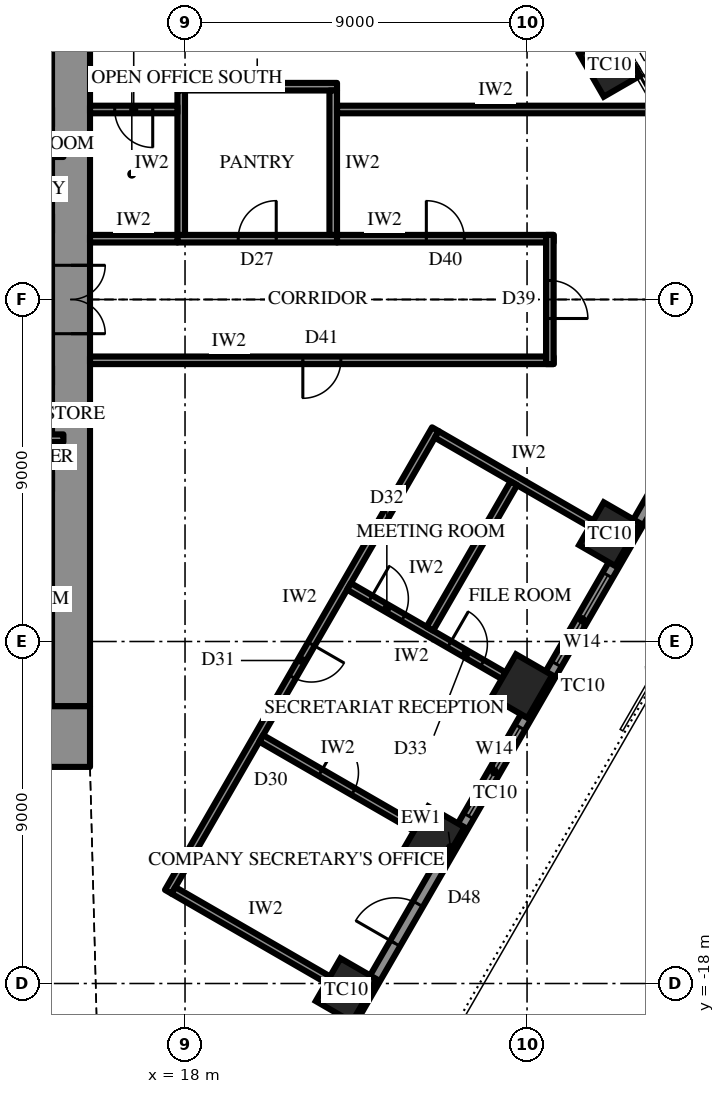
"""IFC4 building model, lengths in metres.
Left out: names, types, materials, properties, quantities, classifications, styles, units other than length and angle.
Written with IfcOpenShell. Run it as: python <this file> out.ifc"""

import sys

from ifc_helpers import new_model, si_unit, direction, frame, frame_2d, origin, origin_2d, place, context, subcontext, project, spatial, rectangle, extrude, element, fill, save


model = new_model("IFC4")
c1 = context("Model", 3, precision=1e-05, world=origin(), true_north=direction((0.0, 1.0)))
c2 = subcontext(c1, "Body", "Model", "MODEL_VIEW")
j1 = project(units=[si_unit("LENGTHUNIT", "METRE"), si_unit("PLANEANGLEUNIT", "RADIAN")], contexts=[c1])
p1 = place(None, origin())
s1 = spatial("IfcSite", under=j1, at=p1, CompositionType="ELEMENT")
p2 = place(p1, origin())
s2 = spatial("IfcBuilding", under=s1, at=p2, CompositionType="ELEMENT")
p3 = place(p2, frame((0.0, 0.0, 253.3)))
s3 = spatial("IfcBuildingStorey", under=s2, at=p3, CompositionType="ELEMENT", Elevation=253.3)
for number, where, z_axis, x_axis in (
    (1, (29.171, 6.175, 0.0), (0.0, 0.0, 1.0), (-0.5, 0.866, 0.0)),
    (2, (22.242, -18.175, 0.0), (0.0, 0.0, 1.0), (0.5, 0.866, 0.0)),
    (3, (24.552, -14.175, 0.0), (0.0, 0.0, 1.0), (0.5, 0.866, 0.0)),
    (4, (26.861, -10.175, 0.0), (0.0, 0.0, 1.0), (0.5, 0.866, 0.0)),
    (5, (29.171, -6.175, 0.0), (0.0, 0.0, 1.0), (0.5, 0.866, 0.0)),
):
    element("IfcColumn", number, at=place(p3, frame(where, z_axis=z_axis, x_axis=x_axis)), inside=s3, PredefinedType="COLUMN", context=c2, shape_type="SweptSolid", body=[
        extrude(rectangle(XDim=1.3, YDim=1.1, at=origin_2d()), origin(), (0.0, 0.0, 1.0), 4.2),
    ])
p4 = place(p3, frame((15.5, -11.5, 0.0), z_axis=(0.0, 0.0, 1.0), x_axis=(-1.0, 0.0, 0.0)))
e6 = element("IfcWall", 6, at=p4, inside=s3, PredefinedType="SHEAR", context=c2, shape_type="SweptSolid", body=[
    extrude(rectangle(XDim=31.0, YDim=1.6, at=frame_2d((15.5, 0.0))), origin(), (0.0, 0.0, 1.0), 4.2),
])
p5 = place(p4, frame((16.35, 0.0, 0.0)))
e7 = element("IfcOpeningElement", 7, at=p5, cuts=e6, PredefinedType="OPENING", context=c2, shape_type="SweptSolid", body=[
    extrude(rectangle(XDim=0.9, YDim=2.2, at=frame_2d((0.45, 1.1))), frame((0.0, 0.81, 0.0), z_axis=(0.0, -1.0, 0.0), x_axis=(1.0, 0.0, 0.0)), (0.0, 0.0, 1.0), 1.62),
])
p6 = place(p4, frame((19.35, 0.0, 0.0)))
e8 = element("IfcOpeningElement", 8, at=p6, cuts=e6, PredefinedType="OPENING", context=c2, shape_type="SweptSolid", body=[
    extrude(rectangle(XDim=0.9, YDim=2.2, at=frame_2d((0.45, 1.1))), frame((0.0, 0.81, 0.0), z_axis=(0.0, -1.0, 0.0), x_axis=(1.0, 0.0, 0.0)), (0.0, 0.0, 1.0), 1.62),
])
p7 = place(p4, frame((22.4, 0.0, 0.0)))
e9 = element("IfcOpeningElement", 9, at=p7, cuts=e6, PredefinedType="OPENING", context=c2, shape_type="SweptSolid", body=[
    extrude(rectangle(XDim=1.0, YDim=2.2, at=frame_2d((0.5, 1.1))), frame((0.0, 0.81, 0.0), z_axis=(0.0, -1.0, 0.0), x_axis=(1.0, 0.0, 0.0)), (0.0, 0.0, 1.0), 1.62),
])
p8 = place(p4, frame((1.65, 0.0, 0.0)))
e10 = element("IfcOpeningElement", 10, at=p8, cuts=e6, PredefinedType="OPENING", context=c2, shape_type="SweptSolid", body=[
    extrude(rectangle(XDim=0.9, YDim=2.2, at=frame_2d((0.45, 1.1))), frame((0.0, 0.81, 0.0), z_axis=(0.0, -1.0, 0.0), x_axis=(1.0, 0.0, 0.0)), (0.0, 0.0, 1.0), 1.62),
])
p9 = place(p4, frame((4.65, 0.0, 0.0)))
e11 = element("IfcOpeningElement", 11, at=p9, cuts=e6, PredefinedType="OPENING", context=c2, shape_type="SweptSolid", body=[
    extrude(rectangle(XDim=0.9, YDim=2.2, at=frame_2d((0.45, 1.1))), frame((0.0, 0.81, 0.0), z_axis=(0.0, -1.0, 0.0), x_axis=(1.0, 0.0, 0.0)), (0.0, 0.0, 1.0), 1.62),
])
p10 = place(p4, frame((25.45, 0.0, 0.0)))
e12 = element("IfcOpeningElement", 12, at=p10, cuts=e6, PredefinedType="OPENING", context=c2, shape_type="SweptSolid", body=[
    extrude(rectangle(XDim=0.9, YDim=2.2, at=frame_2d((0.45, 1.1))), frame((0.0, 0.81, 0.0), z_axis=(0.0, -1.0, 0.0), x_axis=(1.0, 0.0, 0.0)), (0.0, 0.0, 1.0), 1.62),
])
p11 = place(p4, frame((28.45, 0.0, 0.0)))
e13 = element("IfcOpeningElement", 13, at=p11, cuts=e6, PredefinedType="OPENING", context=c2, shape_type="SweptSolid", body=[
    extrude(rectangle(XDim=0.9, YDim=2.2, at=frame_2d((0.45, 1.1))), frame((0.0, 0.81, 0.0), z_axis=(0.0, -1.0, 0.0), x_axis=(1.0, 0.0, 0.0)), (0.0, 0.0, 1.0), 1.62),
])
p12 = place(p3, frame((15.0, -10.7, 0.0), z_axis=(0.0, 0.0, 1.0), x_axis=(0.0, 1.0, 0.0)))
e14 = element("IfcWall", 14, at=p12, inside=s3, PredefinedType="SHEAR", context=c2, shape_type="SweptSolid", body=[
    extrude(rectangle(XDim=21.4, YDim=1.0, at=frame_2d((10.7, 0.0))), origin(), (0.0, 0.0, 1.0), 4.2),
])
p13 = place(p12, frame((9.8, 0.0, 0.0)))
e15 = element("IfcOpeningElement", 15, at=p13, cuts=e14, PredefinedType="OPENING", context=c2, shape_type="SweptSolid", body=[
    extrude(rectangle(XDim=1.8, YDim=2.4, at=frame_2d((0.9, 1.2))), frame((0.0, 0.51, 0.0), z_axis=(0.0, -1.0, 0.0), x_axis=(1.0, 0.0, 0.0)), (0.0, 0.0, 1.0), 1.02),
])
p14 = place(p3, frame((12.3, 2.0, 0.0), z_axis=(0.0, 0.0, 1.0), x_axis=(1.0, 0.0, 0.0)))
e16 = element("IfcWall", 16, at=p14, inside=s3, PredefinedType="SHEAR", context=c2, shape_type="SweptSolid", body=[
    extrude(rectangle(XDim=2.2, YDim=0.5, at=frame_2d((1.1, 0.0))), origin(), (0.0, 0.0, 1.0), 4.2),
])
p15 = place(p14, frame((0.8, 0.0, 0.0)))
e17 = element("IfcOpeningElement", 17, at=p15, cuts=e16, PredefinedType="OPENING", context=c2, shape_type="SweptSolid", body=[
    extrude(rectangle(XDim=0.9, YDim=2.2, at=frame_2d((0.45, 1.1))), frame((0.0, 0.26, 0.0), z_axis=(0.0, -1.0, 0.0), x_axis=(1.0, 0.0, 0.0)), (0.0, 0.0, 1.0), 0.52),
])
p16 = place(p3, frame((12.3, 4.8, 0.0), z_axis=(0.0, 0.0, 1.0), x_axis=(1.0, 0.0, 0.0)))
e18 = element("IfcWall", 18, at=p16, inside=s3, PredefinedType="SHEAR", context=c2, shape_type="SweptSolid", body=[
    extrude(rectangle(XDim=2.2, YDim=0.5, at=frame_2d((1.1, 0.0))), origin(), (0.0, 0.0, 1.0), 4.2),
])
p17 = place(p3, frame((18.707, -25.299, 0.0), z_axis=(0.0, 0.0, 1.0), x_axis=(0.500000442367, 0.866025148383, 0.0)))
e19 = element("IfcWall", 19, at=p17, inside=s3, PredefinedType="SOLIDWALL", context=c2, shape_type="SweptSolid", body=[
    extrude(rectangle(XDim=25.113, YDim=0.3, at=frame_2d((12.556, 0.0))), origin(), (0.0, 0.0, 1.0), 2.8),
])
p18 = place(p17, frame((4.278, 0.0, 0.6)))
e20 = element("IfcOpeningElement", 20, at=p18, cuts=e19, PredefinedType="OPENING", context=c2, shape_type="SweptSolid", body=[
    extrude(rectangle(XDim=2.7, YDim=1.95, at=frame_2d((1.35, 0.975))), frame((0.0, 0.16, 0.0), z_axis=(0.0, -1.0, 0.0), x_axis=(1.0, 0.0, 0.0)), (0.0, 0.0, 1.0), 0.32),
])
p19 = place(p17, frame((9.647, 0.0, 0.0)))
e21 = element("IfcOpeningElement", 21, at=p19, cuts=e19, PredefinedType="OPENING", context=c2, shape_type="SweptSolid", body=[
    extrude(rectangle(XDim=1.2, YDim=2.4, at=frame_2d((0.6, 1.2))), frame((0.0, 0.16, 0.0), z_axis=(0.0, -1.0, 0.0), x_axis=(1.0, 0.0, 0.0)), (0.0, 0.0, 1.0), 0.32),
])
p20 = place(p17, frame((13.516, 0.0, 0.6)))
e22 = element("IfcOpeningElement", 22, at=p20, cuts=e19, PredefinedType="OPENING", context=c2, shape_type="SweptSolid", body=[
    extrude(rectangle(XDim=2.7, YDim=1.95, at=frame_2d((1.35, 0.975))), frame((0.0, 0.16, 0.0), z_axis=(0.0, -1.0, 0.0), x_axis=(1.0, 0.0, 0.0)), (0.0, 0.0, 1.0), 0.32),
])
p21 = place(p17, frame((18.135, 0.0, 0.6)))
e23 = element("IfcOpeningElement", 23, at=p21, cuts=e19, PredefinedType="OPENING", context=c2, shape_type="SweptSolid", body=[
    extrude(rectangle(XDim=2.7, YDim=1.95, at=frame_2d((1.35, 0.975))), frame((0.0, 0.16, 0.0), z_axis=(0.0, -1.0, 0.0), x_axis=(1.0, 0.0, 0.0)), (0.0, 0.0, 1.0), 0.32),
])
p22 = place(p3, frame((12.3, 3.85, 0.0), z_axis=(0.0, 0.0, 1.0), x_axis=(1.0, 0.0, 0.0)))
e24 = element("IfcWall", 24, at=p22, inside=s3, PredefinedType="PARTITIONING", context=c2, shape_type="SweptSolid", body=[
    extrude(rectangle(XDim=2.5, YDim=0.2, at=frame_2d((1.25, 0.0))), origin(), (0.0, 0.0, 1.0), 4.0),
])
p23 = place(p3, frame((14.8, -3.65, 0.0), z_axis=(0.0, 0.0, 1.0), x_axis=(-1.0, 0.0, 0.0)))
e25 = element("IfcWall", 25, at=p23, inside=s3, PredefinedType="PARTITIONING", context=c2, shape_type="SweptSolid", body=[
    extrude(rectangle(XDim=1.0, YDim=0.2, at=frame_2d((0.5, 0.0))), origin(), (0.0, 0.0, 1.0), 4.0),
])
p24 = place(p3, frame((17.559, -15.587, 0.0), z_axis=(0.0, 0.0, 1.0), x_axis=(0.500002095642, 0.866024193862, 0.0)))
e26 = element("IfcWall", 26, at=p24, inside=s3, PredefinedType="PARTITIONING", context=c2, shape_type="SweptSolid", body=[
    extrude(rectangle(XDim=14.057, YDim=0.2, at=frame_2d((7.028, 0.0))), origin(), (0.0, 0.0, 1.0), 4.0),
])
p25 = place(p24, frame((6.528, 0.0, 0.0)))
e27 = element("IfcOpeningElement", 27, at=p25, cuts=e26, PredefinedType="OPENING", context=c2, shape_type="SweptSolid", body=[
    extrude(rectangle(XDim=1.0, YDim=2.2, at=frame_2d((0.5, 1.1))), frame((0.0, 0.11, 0.0), z_axis=(0.0, -1.0, 0.0), x_axis=(1.0, 0.0, 0.0)), (0.0, 0.0, 1.0), 0.22),
])
p26 = place(p3, frame((17.696, -15.55, 0.0), z_axis=(0.0, 0.0, 1.0), x_axis=(0.866038532462, -0.499977259774, 0.0)))
e28 = element("IfcWall", 28, at=p26, inside=s3, PredefinedType="PARTITIONING", context=c2, shape_type="SweptSolid", body=[
    extrude(rectangle(XDim=4.7, YDim=0.2, at=frame_2d((2.35, 0.0))), origin(), (0.0, 0.0, 1.0), 3.082),
])
p27 = place(p3, frame((20.005, -11.55, 0.0), z_axis=(0.0, 0.0, 1.0), x_axis=(0.866038532462, -0.499977259774, 0.0)))
e29 = element("IfcWall", 29, at=p27, inside=s3, PredefinedType="PARTITIONING", context=c2, shape_type="SweptSolid", body=[
    extrude(rectangle(XDim=4.7, YDim=0.2, at=frame_2d((2.35, 0.0))), origin(), (0.0, 0.0, 1.0), 3.082),
])
p28 = place(p27, frame((1.8, 0.0, 0.0)))
e30 = element("IfcOpeningElement", 30, at=p28, cuts=e29, PredefinedType="OPENING", context=c2, shape_type="SweptSolid", body=[
    extrude(rectangle(XDim=1.0, YDim=2.2, at=frame_2d((0.5, 1.1))), frame((0.0, 0.11, 0.0), z_axis=(0.0, -1.0, 0.0), x_axis=(1.0, 0.0, 0.0)), (0.0, 0.0, 1.0), 0.22),
])
p29 = place(p3, frame((22.315, -7.55, 0.0), z_axis=(0.0, 0.0, 1.0), x_axis=(0.866038532462, -0.499977259774, 0.0)))
e31 = element("IfcWall", 31, at=p29, inside=s3, PredefinedType="PARTITIONING", context=c2, shape_type="SweptSolid", body=[
    extrude(rectangle(XDim=4.7, YDim=0.2, at=frame_2d((2.35, 0.0))), origin(), (0.0, 0.0, 1.0), 3.082),
])
p30 = place(p29, frame((0.65, 0.0, 0.0)))
e32 = element("IfcOpeningElement", 32, at=p30, cuts=e31, PredefinedType="OPENING", context=c2, shape_type="SweptSolid", body=[
    extrude(rectangle(XDim=1.0, YDim=2.2, at=frame_2d((0.5, 1.1))), frame((0.0, 0.11, 0.0), z_axis=(0.0, -1.0, 0.0), x_axis=(1.0, 0.0, 0.0)), (0.0, 0.0, 1.0), 0.22),
])
p31 = place(p29, frame((3.05, 0.0, 0.0)))
e33 = element("IfcOpeningElement", 33, at=p31, cuts=e31, PredefinedType="OPENING", context=c2, shape_type="SweptSolid", body=[
    extrude(rectangle(XDim=1.0, YDim=2.2, at=frame_2d((0.5, 1.1))), frame((0.0, 0.11, 0.0), z_axis=(0.0, -1.0, 0.0), x_axis=(1.0, 0.0, 0.0)), (0.0, 0.0, 1.0), 0.22),
])
p32 = place(p3, frame((24.624, -3.55, 0.0), z_axis=(0.0, 0.0, 1.0), x_axis=(0.866038532462, -0.499977259774, 0.0)))
e34 = element("IfcWall", 34, at=p32, inside=s3, PredefinedType="PARTITIONING", context=c2, shape_type="SweptSolid", body=[
    extrude(rectangle(XDim=4.7, YDim=0.2, at=frame_2d((2.35, 0.0))), origin(), (0.0, 0.0, 1.0), 3.082),
])
p33 = place(p3, frame((24.443, -8.663, 0.0), z_axis=(0.0, 0.0, 1.0), x_axis=(0.499983916363, 0.866034689477, 0.0)))
e35 = element("IfcWall", 35, at=p33, inside=s3, PredefinedType="PARTITIONING", context=c2, shape_type="SweptSolid", body=[
    extrude(rectangle(XDim=4.419, YDim=0.2, at=frame_2d((2.209, 0.0))), origin(), (0.0, 0.0, 1.0), 4.0),
])
p34 = place(p3, frame((17.8, 1.6, 0.0), z_axis=(0.0, 0.0, 1.0), x_axis=(1.0, 0.0, 0.0)))
e36 = element("IfcWall", 36, at=p34, inside=s3, PredefinedType="PARTITIONING", context=c2, shape_type="SweptSolid", body=[
    extrude(rectangle(XDim=4.2, YDim=0.2, at=frame_2d((2.1, 0.0))), origin(), (0.0, 0.0, 1.0), 4.0),
])
p35 = place(p34, frame((1.6, 0.0, 0.0)))
e37 = element("IfcOpeningElement", 37, at=p35, cuts=e36, PredefinedType="OPENING", context=c2, shape_type="SweptSolid", body=[
    extrude(rectangle(XDim=1.0, YDim=2.2, at=frame_2d((0.5, 1.1))), frame((0.0, 0.11, 0.0), z_axis=(0.0, -1.0, 0.0), x_axis=(1.0, 0.0, 0.0)), (0.0, 0.0, 1.0), 0.22),
])
p36 = place(p3, frame((17.8, 5.6, 0.0), z_axis=(0.0, 0.0, 1.0), x_axis=(1.0, 0.0, 0.0)))
e38 = element("IfcWall", 38, at=p36, inside=s3, PredefinedType="PARTITIONING", context=c2, shape_type="SweptSolid", body=[
    extrude(rectangle(XDim=4.2, YDim=0.2, at=frame_2d((2.1, 0.0))), origin(), (0.0, 0.0, 1.0), 4.0),
])
for number, where, z_axis, x_axis in (
    (39, (17.9, 1.7, 0.0), (0.0, 0.0, 1.0), (0.0, 1.0, 0.0)),
    (40, (21.9, 1.7, 0.0), (0.0, 0.0, 1.0), (0.0, 1.0, 0.0)),
):
    element("IfcWall", number, at=place(p3, frame(where, z_axis=z_axis, x_axis=x_axis)), inside=s3, PredefinedType="PARTITIONING", context=c2, shape_type="SweptSolid", body=[
        extrude(rectangle(XDim=3.8, YDim=0.2, at=frame_2d((1.9, 0.0))), origin(), (0.0, 0.0, 1.0), 4.0),
    ])
p37 = place(p3, frame((15.5, 1.6, 0.0), z_axis=(0.0, 0.0, 1.0), x_axis=(1.0, 0.0, 0.0)))
e41 = element("IfcWall", 41, at=p37, inside=s3, PredefinedType="PARTITIONING", context=c2, shape_type="SweptSolid", body=[
    extrude(rectangle(XDim=2.3, YDim=0.2, at=frame_2d((1.15, 0.0))), origin(), (0.0, 0.0, 1.0), 4.0),
])
p38 = place(p3, frame((22.0, 1.6, 0.0), z_axis=(0.0, 0.0, 1.0), x_axis=(1.0, 0.0, 0.0)))
e42 = element("IfcWall", 42, at=p38, inside=s3, PredefinedType="PARTITIONING", context=c2, shape_type="SweptSolid", body=[
    extrude(rectangle(XDim=5.7, YDim=0.2, at=frame_2d((2.85, 0.0))), origin(), (0.0, 0.0, 1.0), 4.0),
])
p39 = place(p38, frame((2.35, 0.0, 0.0)))
e43 = element("IfcOpeningElement", 43, at=p39, cuts=e42, PredefinedType="OPENING", context=c2, shape_type="SweptSolid", body=[
    extrude(rectangle(XDim=1.0, YDim=2.2, at=frame_2d((0.5, 1.1))), frame((0.0, 0.11, 0.0), z_axis=(0.0, -1.0, 0.0), x_axis=(1.0, 0.0, 0.0)), (0.0, 0.0, 1.0), 0.22),
])
p40 = place(p3, frame((15.5, -1.6, 0.0), z_axis=(0.0, 0.0, 1.0), x_axis=(1.0, 0.0, 0.0)))
e44 = element("IfcWall", 44, at=p40, inside=s3, PredefinedType="PARTITIONING", context=c2, shape_type="SweptSolid", body=[
    extrude(rectangle(XDim=12.2, YDim=0.2, at=frame_2d((6.1, 0.0))), origin(), (0.0, 0.0, 1.0), 4.0),
])
p41 = place(p40, frame((5.6, 0.0, 0.0)))
e45 = element("IfcOpeningElement", 45, at=p41, cuts=e44, PredefinedType="OPENING", context=c2, shape_type="SweptSolid", body=[
    extrude(rectangle(XDim=1.0, YDim=2.2, at=frame_2d((0.5, 1.1))), frame((0.0, 0.11, 0.0), z_axis=(0.0, -1.0, 0.0), x_axis=(1.0, 0.0, 0.0)), (0.0, 0.0, 1.0), 0.22),
])
p42 = place(p3, frame((27.6, -1.7, 0.0), z_axis=(0.0, 0.0, 1.0), x_axis=(0.0, 1.0, 0.0)))
e46 = element("IfcWall", 46, at=p42, inside=s3, PredefinedType="PARTITIONING", context=c2, shape_type="SweptSolid", body=[
    extrude(rectangle(XDim=3.4, YDim=0.2, at=frame_2d((1.7, 0.0))), origin(), (0.0, 0.0, 1.0), 4.0),
])
p43 = place(p42, frame((1.2, 0.0, 0.0)))
e47 = element("IfcOpeningElement", 47, at=p43, cuts=e46, PredefinedType="OPENING", context=c2, shape_type="SweptSolid", body=[
    extrude(rectangle(XDim=1.0, YDim=2.2, at=frame_2d((0.5, 1.1))), frame((0.0, 0.11, 0.0), z_axis=(0.0, -1.0, 0.0), x_axis=(1.0, 0.0, 0.0)), (0.0, 0.0, 1.0), 0.22),
])
p44 = place(p3, frame((15.5, 5.0, 0.0), z_axis=(0.0, 0.0, 1.0), x_axis=(1.0, 0.0, 0.0)))
e48 = element("IfcWall", 48, at=p44, inside=s3, PredefinedType="PARTITIONING", context=c2, shape_type="SweptSolid", body=[
    extrude(rectangle(XDim=2.3, YDim=0.2, at=frame_2d((1.15, 0.0))), origin(), (0.0, 0.0, 1.0), 4.0),
])
p45 = place(p44, frame((0.65, 0.0, 0.0)))
e49 = element("IfcOpeningElement", 49, at=p45, cuts=e48, PredefinedType="OPENING", context=c2, shape_type="SweptSolid", body=[
    extrude(rectangle(XDim=1.0, YDim=2.2, at=frame_2d((0.5, 1.1))), frame((0.0, 0.11, 0.0), z_axis=(0.0, -1.0, 0.0), x_axis=(1.0, 0.0, 0.0)), (0.0, 0.0, 1.0), 0.22),
])
p46 = place(p3, frame((22.0, 5.0, 0.0), z_axis=(0.0, 0.0, 1.0), x_axis=(1.0, 0.0, 0.0)))
e50 = element("IfcWall", 50, at=p46, inside=s3, PredefinedType="PARTITIONING", context=c2, shape_type="SweptSolid", body=[
    extrude(rectangle(XDim=8.345, YDim=0.2, at=frame_2d((4.173, 0.0))), origin(), (0.0, 0.0, 1.0), 4.0),
])
p47 = place(p19, origin())
e51 = element("IfcDoor", 51, at=p47, inside=s3, OperationType="SINGLE_SWING_RIGHT", PredefinedType="DOOR", context=c2, shape_type="SweptSolid", body=[
    extrude(rectangle(XDim=1.2, YDim=2.4, at=frame_2d((0.6, 1.2))), frame((0.0, 0.025, 0.0), z_axis=(0.0, -1.0, 0.0), x_axis=(1.0, 0.0, 0.0)), (0.0, 0.0, 1.0), 0.05),
])
fill(e21, e51)
p48 = place(p20, origin())
e52 = element("IfcWindow", 52, at=p48, inside=s3, PartitioningType="SINGLE_PANEL", PredefinedType="WINDOW", context=c2, shape_type="SweptSolid", body=[
    extrude(rectangle(XDim=2.7, YDim=1.95, at=frame_2d((1.35, 0.975))), frame((0.0, 0.03, 0.0), z_axis=(0.0, -1.0, 0.0), x_axis=(1.0, 0.0, 0.0)), (0.0, 0.0, 1.0), 0.06),
])
fill(e22, e52)
p49 = place(p21, origin())
e53 = element("IfcWindow", 53, at=p49, inside=s3, PartitioningType="SINGLE_PANEL", PredefinedType="WINDOW", context=c2, shape_type="SweptSolid", body=[
    extrude(rectangle(XDim=2.7, YDim=1.95, at=frame_2d((1.35, 0.975))), frame((0.0, 0.03, 0.0), z_axis=(0.0, -1.0, 0.0), x_axis=(1.0, 0.0, 0.0)), (0.0, 0.0, 1.0), 0.06),
])
fill(e23, e53)
p50 = place(p13, frame((1.8, 0.0, 0.0), z_axis=(0.0, 0.0, 1.0), x_axis=(-1.0, 0.0, 0.0)))
e54 = element("IfcDoor", 54, at=p50, inside=s3, OperationType="DOUBLE_DOOR_SINGLE_SWING", PredefinedType="DOOR", context=c2, shape_type="SweptSolid", body=[
    extrude(rectangle(XDim=1.8, YDim=2.4, at=frame_2d((0.9, 1.2))), frame((0.0, 0.025, 0.0), z_axis=(0.0, -1.0, 0.0), x_axis=(1.0, 0.0, 0.0)), (0.0, 0.0, 1.0), 0.05),
])
fill(e15, e54)
p51 = place(p28, origin())
e55 = element("IfcDoor", 55, at=p51, inside=s3, OperationType="SINGLE_SWING_RIGHT", PredefinedType="DOOR", context=c2, shape_type="SweptSolid", body=[
    extrude(rectangle(XDim=1.0, YDim=2.2, at=frame_2d((0.5, 1.1))), frame((0.0, 0.025, 0.0), z_axis=(0.0, -1.0, 0.0), x_axis=(1.0, 0.0, 0.0)), (0.0, 0.0, 1.0), 0.05),
])
fill(e30, e55)
p52 = place(p25, frame((1.0, 0.0, 0.0), z_axis=(0.0, 0.0, 1.0), x_axis=(-1.0, 0.0, 0.0)))
e56 = element("IfcDoor", 56, at=p52, inside=s3, OperationType="SINGLE_SWING_RIGHT", PredefinedType="DOOR", context=c2, shape_type="SweptSolid", body=[
    extrude(rectangle(XDim=1.0, YDim=2.2, at=frame_2d((0.5, 1.1))), frame((0.0, 0.025, 0.0), z_axis=(0.0, -1.0, 0.0), x_axis=(1.0, 0.0, 0.0)), (0.0, 0.0, 1.0), 0.05),
])
fill(e27, e56)
p53 = place(p30, origin())
e57 = element("IfcDoor", 57, at=p53, inside=s3, OperationType="SINGLE_SWING_RIGHT", PredefinedType="DOOR", context=c2, shape_type="SweptSolid", body=[
    extrude(rectangle(XDim=1.0, YDim=2.2, at=frame_2d((0.5, 1.1))), frame((0.0, 0.025, 0.0), z_axis=(0.0, -1.0, 0.0), x_axis=(1.0, 0.0, 0.0)), (0.0, 0.0, 1.0), 0.05),
])
fill(e32, e57)
p54 = place(p31, origin())
e58 = element("IfcDoor", 58, at=p54, inside=s3, OperationType="SINGLE_SWING_RIGHT", PredefinedType="DOOR", context=c2, shape_type="SweptSolid", body=[
    extrude(rectangle(XDim=1.0, YDim=2.2, at=frame_2d((0.5, 1.1))), frame((0.0, 0.025, 0.0), z_axis=(0.0, -1.0, 0.0), x_axis=(1.0, 0.0, 0.0)), (0.0, 0.0, 1.0), 0.05),
])
fill(e33, e58)
p55 = place(p35, origin())
e59 = element("IfcDoor", 59, at=p55, inside=s3, OperationType="SINGLE_SWING_LEFT", PredefinedType="DOOR", context=c2, shape_type="SweptSolid", body=[
    extrude(rectangle(XDim=1.0, YDim=2.2, at=frame_2d((0.5, 1.1))), frame((0.0, 0.025, 0.0), z_axis=(0.0, -1.0, 0.0), x_axis=(1.0, 0.0, 0.0)), (0.0, 0.0, 1.0), 0.05),
])
fill(e37, e59)
p56 = place(p39, origin())
e60 = element("IfcDoor", 60, at=p56, inside=s3, OperationType="SINGLE_SWING_RIGHT", PredefinedType="DOOR", context=c2, shape_type="SweptSolid", body=[
    extrude(rectangle(XDim=1.0, YDim=2.2, at=frame_2d((0.5, 1.1))), frame((0.0, 0.025, 0.0), z_axis=(0.0, -1.0, 0.0), x_axis=(1.0, 0.0, 0.0)), (0.0, 0.0, 1.0), 0.05),
])
fill(e43, e60)
p57 = place(p41, frame((1.0, 0.0, 0.0), z_axis=(0.0, 0.0, 1.0), x_axis=(-1.0, 0.0, 0.0)))
e61 = element("IfcDoor", 61, at=p57, inside=s3, OperationType="SINGLE_SWING_LEFT", PredefinedType="DOOR", context=c2, shape_type="SweptSolid", body=[
    extrude(rectangle(XDim=1.0, YDim=2.2, at=frame_2d((0.5, 1.1))), frame((0.0, 0.025, 0.0), z_axis=(0.0, -1.0, 0.0), x_axis=(1.0, 0.0, 0.0)), (0.0, 0.0, 1.0), 0.05),
])
fill(e45, e61)
p58 = place(p43, frame((1.0, 0.0, 0.0), z_axis=(0.0, 0.0, 1.0), x_axis=(-1.0, 0.0, 0.0)))
e62 = element("IfcDoor", 62, at=p58, inside=s3, OperationType="SINGLE_SWING_LEFT", PredefinedType="DOOR", context=c2, shape_type="SweptSolid", body=[
    extrude(rectangle(XDim=1.0, YDim=2.2, at=frame_2d((0.5, 1.1))), frame((0.0, 0.025, 0.0), z_axis=(0.0, -1.0, 0.0), x_axis=(1.0, 0.0, 0.0)), (0.0, 0.0, 1.0), 0.05),
])
fill(e47, e62)
p59 = place(p45, frame((1.0, 0.0, 0.0), z_axis=(0.0, 0.0, 1.0), x_axis=(-1.0, 0.0, 0.0)))
e63 = element("IfcDoor", 63, at=p59, inside=s3, OperationType="SINGLE_SWING_RIGHT", PredefinedType="DOOR", context=c2, shape_type="SweptSolid", body=[
    extrude(rectangle(XDim=1.0, YDim=2.2, at=frame_2d((0.5, 1.1))), frame((0.0, 0.025, 0.0), z_axis=(0.0, -1.0, 0.0), x_axis=(1.0, 0.0, 0.0)), (0.0, 0.0, 1.0), 0.05),
])
fill(e49, e63)
save(model, sys.argv[1])
